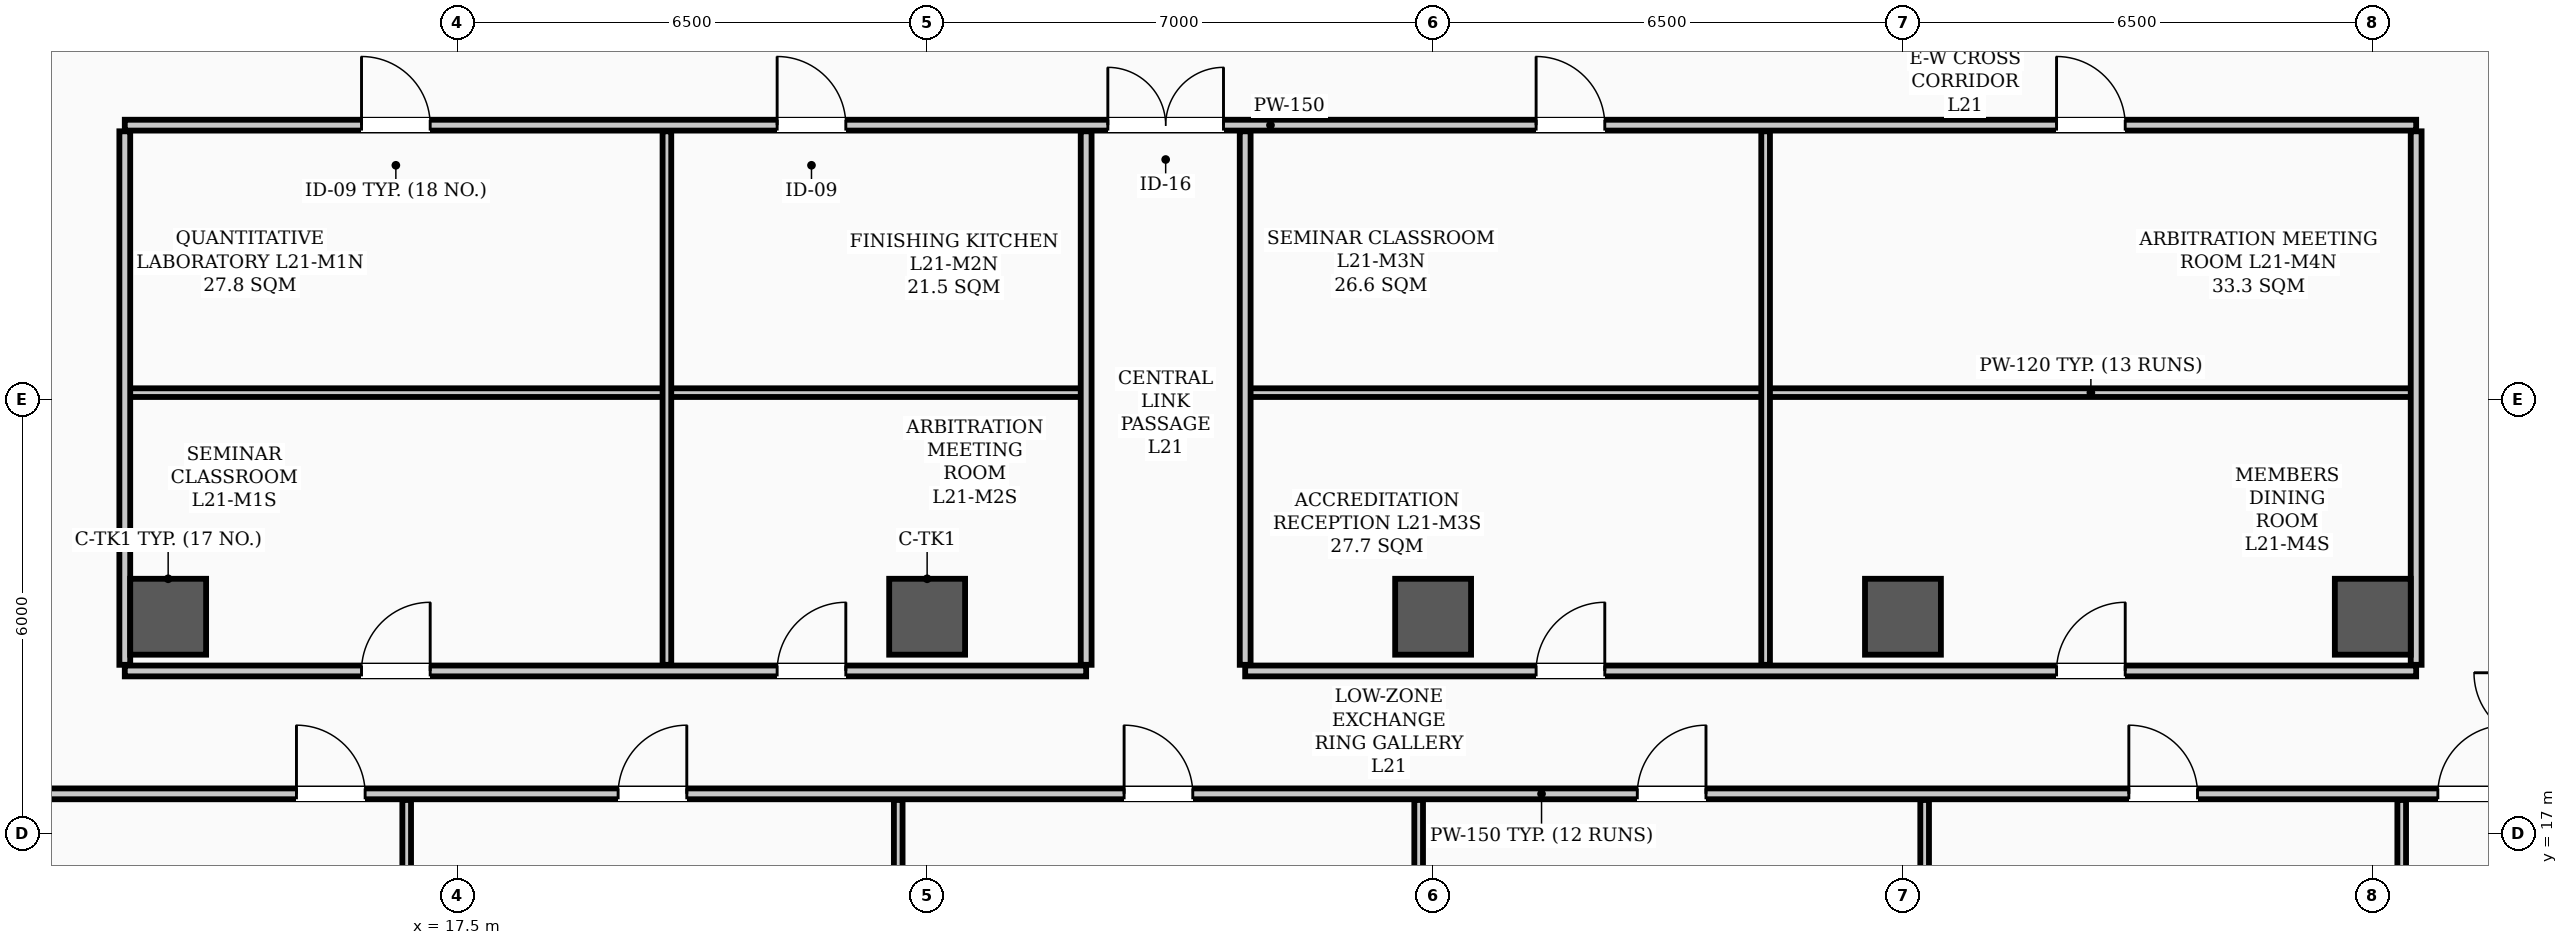
"""IFC4 building model, lengths in metres.
Left out: names, types, materials, properties, quantities, classifications, styles, units other than length and angle.
Written with IfcOpenShell. Run it as: python <this file> out.ifc"""

import sys

from ifc_helpers import new_model, si_unit, direction, frame, frame_2d, origin, origin_2d, place, context, subcontext, project, spatial, rectangle, hollow_rectangle, extrude, element, fill, save


model = new_model("IFC4")
c1 = context("Model", 3, precision=1e-05, world=origin(), true_north=direction((0.0, 1.0)))
c2 = subcontext(c1, "Body", "Model", "MODEL_VIEW")
j1 = project(units=[si_unit("LENGTHUNIT", "METRE"), si_unit("PLANEANGLEUNIT", "RADIAN")], contexts=[c1])
p1 = place(None, origin())
s1 = spatial("IfcSite", under=j1, at=p1, CompositionType="ELEMENT")
p2 = place(p1, origin())
s2 = spatial("IfcBuilding", under=s1, at=p2, CompositionType="ELEMENT")
p3 = place(p2, frame((0.0, 0.0, 85.0)))
s3 = spatial("IfcBuildingStorey", under=s2, at=p3, CompositionType="ELEMENT", Elevation=85.0)
for number, where, z_axis, x_axis in (
    (1, (13.5, 20.0, 0.0), (0.0, 0.0, 1.0), (1.0, 0.0, 0.0)),
    (2, (24.0, 20.0, 0.0), (0.0, 0.0, 1.0), (1.0, 0.0, 0.0)),
    (3, (31.0, 20.0, 0.0), (0.0, 0.0, 1.0), (1.0, 0.0, 0.0)),
    (4, (37.5, 20.0, 0.0), (0.0, 0.0, 1.0), (1.0, 0.0, 0.0)),
    (5, (44.0, 20.0, 0.0), (0.0, 0.0, 1.0), (1.0, 0.0, 0.0)),
):
    element("IfcColumn", number, at=place(p3, frame(where, z_axis=z_axis, x_axis=x_axis)), inside=s3, PredefinedType="COLUMN", context=c2, shape_type="SweptSolid", body=[
        extrude(hollow_rectangle(XDim=1.05, YDim=1.05, WallThickness=0.038, InnerFilletRadius=0.019, OuterFilletRadius=0.057, at=origin_2d()), origin(), (0.0, 0.0, 1.0), 3.9),
    ])
p4 = place(p3, frame((12.9, 26.8, 0.0), z_axis=(0.0, 0.0, 1.0), x_axis=(1.0, 0.0, 0.0)))
e6 = element("IfcWall", 6, at=p4, inside=s3, PredefinedType="PARTITIONING", context=c2, shape_type="SweptSolid", body=[
    extrude(rectangle(XDim=31.7, YDim=0.15, at=frame_2d((15.85, 0.0))), origin(), (0.0, 0.0, 1.0), 3.1),
])
p5 = place(p4, frame((13.6, 0.0, 0.0)))
e7 = element("IfcOpeningElement", 7, at=p5, cuts=e6, PredefinedType="OPENING", context=c2, shape_type="SweptSolid", body=[
    extrude(rectangle(XDim=1.6, YDim=2.08, at=frame_2d((0.8, 1.04))), frame((0.0, 0.085, 0.0), z_axis=(0.0, -1.0, 0.0), x_axis=(1.0, 0.0, 0.0)), (0.0, 0.0, 1.0), 0.17),
])
p6 = place(p4, frame((3.275, 0.0, 0.0)))
e8 = element("IfcOpeningElement", 8, at=p6, cuts=e6, PredefinedType="OPENING", context=c2, shape_type="SweptSolid", body=[
    extrude(rectangle(XDim=0.95, YDim=2.08, at=frame_2d((0.475, 1.04))), frame((0.0, 0.085, 0.0), z_axis=(0.0, -1.0, 0.0), x_axis=(1.0, 0.0, 0.0)), (0.0, 0.0, 1.0), 0.17),
])
p7 = place(p4, frame((9.025, 0.0, 0.0)))
e9 = element("IfcOpeningElement", 9, at=p7, cuts=e6, PredefinedType="OPENING", context=c2, shape_type="SweptSolid", body=[
    extrude(rectangle(XDim=0.95, YDim=2.08, at=frame_2d((0.475, 1.04))), frame((0.0, 0.085, 0.0), z_axis=(0.0, -1.0, 0.0), x_axis=(1.0, 0.0, 0.0)), (0.0, 0.0, 1.0), 0.17),
])
p8 = place(p4, frame((19.525, 0.0, 0.0)))
e10 = element("IfcOpeningElement", 10, at=p8, cuts=e6, PredefinedType="OPENING", context=c2, shape_type="SweptSolid", body=[
    extrude(rectangle(XDim=0.95, YDim=2.08, at=frame_2d((0.475, 1.04))), frame((0.0, 0.085, 0.0), z_axis=(0.0, -1.0, 0.0), x_axis=(1.0, 0.0, 0.0)), (0.0, 0.0, 1.0), 0.17),
])
p9 = place(p4, frame((26.725, 0.0, 0.0)))
e11 = element("IfcOpeningElement", 11, at=p9, cuts=e6, PredefinedType="OPENING", context=c2, shape_type="SweptSolid", body=[
    extrude(rectangle(XDim=0.95, YDim=2.08, at=frame_2d((0.475, 1.04))), frame((0.0, 0.085, 0.0), z_axis=(0.0, -1.0, 0.0), x_axis=(1.0, 0.0, 0.0)), (0.0, 0.0, 1.0), 0.17),
])
p10 = place(p3, frame((7.81, 17.55, 0.0), z_axis=(0.0, 0.0, 1.0), x_axis=(1.0, 0.0, 0.0)))
e12 = element("IfcWall", 12, at=p10, inside=s3, PredefinedType="PARTITIONING", context=c2, shape_type="SweptSolid", body=[
    extrude(rectangle(XDim=49.38, YDim=0.15, at=frame_2d((24.69, 0.0))), origin(), (0.0, 0.0, 1.0), 3.1),
])
p11 = place(p10, frame((7.465, 0.0, 0.0)))
e13 = element("IfcOpeningElement", 13, at=p11, cuts=e12, PredefinedType="OPENING", context=c2, shape_type="SweptSolid", body=[
    extrude(rectangle(XDim=0.95, YDim=2.08, at=frame_2d((0.475, 1.04))), frame((0.0, 0.085, 0.0), z_axis=(0.0, -1.0, 0.0), x_axis=(1.0, 0.0, 0.0)), (0.0, 0.0, 1.0), 0.17),
])
p12 = place(p10, frame((11.915, 0.0, 0.0)))
e14 = element("IfcOpeningElement", 14, at=p12, cuts=e12, PredefinedType="OPENING", context=c2, shape_type="SweptSolid", body=[
    extrude(rectangle(XDim=0.95, YDim=2.08, at=frame_2d((0.475, 1.04))), frame((0.0, 0.085, 0.0), z_axis=(0.0, -1.0, 0.0), x_axis=(1.0, 0.0, 0.0)), (0.0, 0.0, 1.0), 0.17),
])
p13 = place(p10, frame((18.915, 0.0, 0.0)))
e15 = element("IfcOpeningElement", 15, at=p13, cuts=e12, PredefinedType="OPENING", context=c2, shape_type="SweptSolid", body=[
    extrude(rectangle(XDim=0.95, YDim=2.08, at=frame_2d((0.475, 1.04))), frame((0.0, 0.085, 0.0), z_axis=(0.0, -1.0, 0.0), x_axis=(1.0, 0.0, 0.0)), (0.0, 0.0, 1.0), 0.17),
])
p14 = place(p10, frame((26.015, 0.0, 0.0)))
e16 = element("IfcOpeningElement", 16, at=p14, cuts=e12, PredefinedType="OPENING", context=c2, shape_type="SweptSolid", body=[
    extrude(rectangle(XDim=0.95, YDim=2.08, at=frame_2d((0.475, 1.04))), frame((0.0, 0.085, 0.0), z_axis=(0.0, -1.0, 0.0), x_axis=(1.0, 0.0, 0.0)), (0.0, 0.0, 1.0), 0.17),
])
p15 = place(p10, frame((32.815, 0.0, 0.0)))
e17 = element("IfcOpeningElement", 17, at=p15, cuts=e12, PredefinedType="OPENING", context=c2, shape_type="SweptSolid", body=[
    extrude(rectangle(XDim=0.95, YDim=2.08, at=frame_2d((0.475, 1.04))), frame((0.0, 0.085, 0.0), z_axis=(0.0, -1.0, 0.0), x_axis=(1.0, 0.0, 0.0)), (0.0, 0.0, 1.0), 0.17),
])
p16 = place(p10, frame((37.09, 0.0, 0.0)))
e18 = element("IfcOpeningElement", 18, at=p16, cuts=e12, PredefinedType="OPENING", context=c2, shape_type="SweptSolid", body=[
    extrude(rectangle(XDim=0.95, YDim=2.08, at=frame_2d((0.475, 1.04))), frame((0.0, 0.085, 0.0), z_axis=(0.0, -1.0, 0.0), x_axis=(1.0, 0.0, 0.0)), (0.0, 0.0, 1.0), 0.17),
])
p17 = place(p3, frame((12.9, 19.25, 0.0), z_axis=(0.0, 0.0, 1.0), x_axis=(1.0, 0.0, 0.0)))
e19 = element("IfcWall", 19, at=p17, inside=s3, PredefinedType="PARTITIONING", context=c2, shape_type="SweptSolid", body=[
    extrude(rectangle(XDim=13.3, YDim=0.15, at=frame_2d((6.65, 0.0))), origin(), (0.0, 0.0, 1.0), 3.1),
])
p18 = place(p17, frame((3.275, 0.0, 0.0)))
e20 = element("IfcOpeningElement", 20, at=p18, cuts=e19, PredefinedType="OPENING", context=c2, shape_type="SweptSolid", body=[
    extrude(rectangle(XDim=0.95, YDim=2.08, at=frame_2d((0.475, 1.04))), frame((0.0, 0.085, 0.0), z_axis=(0.0, -1.0, 0.0), x_axis=(1.0, 0.0, 0.0)), (0.0, 0.0, 1.0), 0.17),
])
p19 = place(p17, frame((9.025, 0.0, 0.0)))
e21 = element("IfcOpeningElement", 21, at=p19, cuts=e19, PredefinedType="OPENING", context=c2, shape_type="SweptSolid", body=[
    extrude(rectangle(XDim=0.95, YDim=2.08, at=frame_2d((0.475, 1.04))), frame((0.0, 0.085, 0.0), z_axis=(0.0, -1.0, 0.0), x_axis=(1.0, 0.0, 0.0)), (0.0, 0.0, 1.0), 0.17),
])
p20 = place(p3, frame((28.4, 19.25, 0.0), z_axis=(0.0, 0.0, 1.0), x_axis=(1.0, 0.0, 0.0)))
e22 = element("IfcWall", 22, at=p20, inside=s3, PredefinedType="PARTITIONING", context=c2, shape_type="SweptSolid", body=[
    extrude(rectangle(XDim=16.2, YDim=0.15, at=frame_2d((8.1, 0.0))), origin(), (0.0, 0.0, 1.0), 3.1),
])
p21 = place(p20, frame((4.025, 0.0, 0.0)))
e23 = element("IfcOpeningElement", 23, at=p21, cuts=e22, PredefinedType="OPENING", context=c2, shape_type="SweptSolid", body=[
    extrude(rectangle(XDim=0.95, YDim=2.08, at=frame_2d((0.475, 1.04))), frame((0.0, 0.085, 0.0), z_axis=(0.0, -1.0, 0.0), x_axis=(1.0, 0.0, 0.0)), (0.0, 0.0, 1.0), 0.17),
])
p22 = place(p20, frame((11.225, 0.0, 0.0)))
e24 = element("IfcOpeningElement", 24, at=p22, cuts=e22, PredefinedType="OPENING", context=c2, shape_type="SweptSolid", body=[
    extrude(rectangle(XDim=0.95, YDim=2.08, at=frame_2d((0.475, 1.04))), frame((0.0, 0.085, 0.0), z_axis=(0.0, -1.0, 0.0), x_axis=(1.0, 0.0, 0.0)), (0.0, 0.0, 1.0), 0.17),
])
p23 = place(p3, frame((12.9, 23.1, 0.0), z_axis=(0.0, 0.0, 1.0), x_axis=(1.0, 0.0, 0.0)))
e25 = element("IfcWall", 25, at=p23, inside=s3, PredefinedType="PARTITIONING", context=c2, shape_type="SweptSolid", body=[
    extrude(rectangle(XDim=7.5, YDim=0.12, at=frame_2d((3.75, 0.0))), origin(), (0.0, 0.0, 1.0), 3.1),
])
p24 = place(p3, frame((20.4, 23.1, 0.0), z_axis=(0.0, 0.0, 1.0), x_axis=(1.0, 0.0, 0.0)))
e26 = element("IfcWall", 26, at=p24, inside=s3, PredefinedType="PARTITIONING", context=c2, shape_type="SweptSolid", body=[
    extrude(rectangle(XDim=5.8, YDim=0.12, at=frame_2d((2.9, 0.0))), origin(), (0.0, 0.0, 1.0), 3.1),
])
p25 = place(p3, frame((28.4, 23.1, 0.0), z_axis=(0.0, 0.0, 1.0), x_axis=(1.0, 0.0, 0.0)))
e27 = element("IfcWall", 27, at=p25, inside=s3, PredefinedType="PARTITIONING", context=c2, shape_type="SweptSolid", body=[
    extrude(rectangle(XDim=7.2, YDim=0.12, at=frame_2d((3.6, 0.0))), origin(), (0.0, 0.0, 1.0), 3.1),
])
p26 = place(p3, frame((35.6, 23.1, 0.0), z_axis=(0.0, 0.0, 1.0), x_axis=(1.0, 0.0, 0.0)))
e28 = element("IfcWall", 28, at=p26, inside=s3, PredefinedType="PARTITIONING", context=c2, shape_type="SweptSolid", body=[
    extrude(rectangle(XDim=9.0, YDim=0.12, at=frame_2d((4.5, 0.0))), origin(), (0.0, 0.0, 1.0), 3.1),
])
for number, where, z_axis, x_axis in (
    (29, (26.2, 19.335, 0.0), (0.0, 0.0, 1.0), (0.0, 1.0, 0.0)),
    (30, (28.4, 19.335, 0.0), (0.0, 0.0, 1.0), (0.0, 1.0, 0.0)),
    (31, (12.9, 19.335, 0.0), (0.0, 0.0, 1.0), (0.0, 1.0, 0.0)),
    (32, (44.6, 19.335, 0.0), (0.0, 0.0, 1.0), (0.0, 1.0, 0.0)),
):
    element("IfcWall", number, at=place(p3, frame(where, z_axis=z_axis, x_axis=x_axis)), inside=s3, PredefinedType="PARTITIONING", context=c2, shape_type="SweptSolid", body=[
        extrude(rectangle(XDim=7.38, YDim=0.15, at=frame_2d((3.69, 0.0))), origin(), (0.0, 0.0, 1.0), 3.0),
    ])
p27 = place(p3, frame((16.8, 9.81, 0.0), z_axis=(0.0, 0.0, 1.0), x_axis=(0.0, 1.0, 0.0)))
e33 = element("IfcWall", 33, at=p27, inside=s3, PredefinedType="PARTITIONING", context=c2, shape_type="SweptSolid", body=[
    extrude(rectangle(XDim=7.655, YDim=0.12, at=frame_2d((3.828, 0.0))), origin(), (0.0, 0.0, 1.0), 3.212),
])
p28 = place(p3, frame((23.6, 11.57, 0.0), z_axis=(0.0, 0.0, 1.0), x_axis=(0.0, 1.0, 0.0)))
e34 = element("IfcWall", 34, at=p28, inside=s3, PredefinedType="PARTITIONING", context=c2, shape_type="SweptSolid", body=[
    extrude(rectangle(XDim=5.895, YDim=0.12, at=frame_2d((2.948, 0.0))), origin(), (0.0, 0.0, 1.0), 3.1),
])
for number, where, z_axis, x_axis in (
    (35, (30.8, 9.81, 0.0), (0.0, 0.0, 1.0), (0.0, 1.0, 0.0)),
    (36, (37.8, 9.81, 0.0), (0.0, 0.0, 1.0), (0.0, 1.0, 0.0)),
    (37, (44.4, 9.81, 0.0), (0.0, 0.0, 1.0), (0.0, 1.0, 0.0)),
):
    element("IfcWall", number, at=place(p3, frame(where, z_axis=z_axis, x_axis=x_axis)), inside=s3, PredefinedType="PARTITIONING", context=c2, shape_type="SweptSolid", body=[
        extrude(rectangle(XDim=7.655, YDim=0.12, at=frame_2d((3.828, 0.0))), origin(), (0.0, 0.0, 1.0), 3.1),
    ])
for number, where, z_axis, x_axis in (
    (38, (20.4, 19.335, 0.0), (0.0, 0.0, 1.0), (0.0, 1.0, 0.0)),
    (39, (35.6, 19.335, 0.0), (0.0, 0.0, 1.0), (0.0, 1.0, 0.0)),
):
    element("IfcWall", number, at=place(p3, frame(where, z_axis=z_axis, x_axis=x_axis)), inside=s3, PredefinedType="PARTITIONING", context=c2, shape_type="SweptSolid", body=[
        extrude(rectangle(XDim=7.38, YDim=0.12, at=frame_2d((3.69, 0.0))), origin(), (0.0, 0.0, 1.0), 3.0),
    ])
p29 = place(p5, origin())
e40 = element("IfcDoor", 40, at=p29, inside=s3, OperationType="DOUBLE_DOOR_SINGLE_SWING", PredefinedType="DOOR", context=c2, shape_type="SweptSolid", body=[
    extrude(rectangle(XDim=1.6, YDim=2.08, at=frame_2d((0.8, 1.04))), frame((0.0, 0.025, 0.0), z_axis=(0.0, -1.0, 0.0), x_axis=(1.0, 0.0, 0.0)), (0.0, 0.0, 1.0), 0.05),
])
fill(e7, e40)
p30 = place(p11, origin())
e41 = element("IfcDoor", 41, at=p30, inside=s3, OperationType="SINGLE_SWING_LEFT", PredefinedType="DOOR", context=c2, shape_type="SweptSolid", body=[
    extrude(rectangle(XDim=0.95, YDim=2.08, at=frame_2d((0.475, 1.04))), frame((0.0, 0.025, 0.0), z_axis=(0.0, -1.0, 0.0), x_axis=(1.0, 0.0, 0.0)), (0.0, 0.0, 1.0), 0.05),
])
fill(e13, e41)
p31 = place(p12, origin())
e42 = element("IfcDoor", 42, at=p31, inside=s3, OperationType="SINGLE_SWING_RIGHT", PredefinedType="DOOR", context=c2, shape_type="SweptSolid", body=[
    extrude(rectangle(XDim=0.95, YDim=2.08, at=frame_2d((0.475, 1.04))), frame((0.0, 0.025, 0.0), z_axis=(0.0, -1.0, 0.0), x_axis=(1.0, 0.0, 0.0)), (0.0, 0.0, 1.0), 0.05),
])
fill(e14, e42)
p32 = place(p13, origin())
e43 = element("IfcDoor", 43, at=p32, inside=s3, OperationType="SINGLE_SWING_LEFT", PredefinedType="DOOR", context=c2, shape_type="SweptSolid", body=[
    extrude(rectangle(XDim=0.95, YDim=2.08, at=frame_2d((0.475, 1.04))), frame((0.0, 0.025, 0.0), z_axis=(0.0, -1.0, 0.0), x_axis=(1.0, 0.0, 0.0)), (0.0, 0.0, 1.0), 0.05),
])
fill(e15, e43)
p33 = place(p14, origin())
e44 = element("IfcDoor", 44, at=p33, inside=s3, OperationType="SINGLE_SWING_RIGHT", PredefinedType="DOOR", context=c2, shape_type="SweptSolid", body=[
    extrude(rectangle(XDim=0.95, YDim=2.08, at=frame_2d((0.475, 1.04))), frame((0.0, 0.025, 0.0), z_axis=(0.0, -1.0, 0.0), x_axis=(1.0, 0.0, 0.0)), (0.0, 0.0, 1.0), 0.05),
])
fill(e16, e44)
p34 = place(p15, origin())
e45 = element("IfcDoor", 45, at=p34, inside=s3, OperationType="SINGLE_SWING_LEFT", PredefinedType="DOOR", context=c2, shape_type="SweptSolid", body=[
    extrude(rectangle(XDim=0.95, YDim=2.08, at=frame_2d((0.475, 1.04))), frame((0.0, 0.025, 0.0), z_axis=(0.0, -1.0, 0.0), x_axis=(1.0, 0.0, 0.0)), (0.0, 0.0, 1.0), 0.05),
])
fill(e17, e45)
p35 = place(p16, origin())
e46 = element("IfcDoor", 46, at=p35, inside=s3, OperationType="SINGLE_SWING_RIGHT", PredefinedType="DOOR", context=c2, shape_type="SweptSolid", body=[
    extrude(rectangle(XDim=0.95, YDim=2.08, at=frame_2d((0.475, 1.04))), frame((0.0, 0.025, 0.0), z_axis=(0.0, -1.0, 0.0), x_axis=(1.0, 0.0, 0.0)), (0.0, 0.0, 1.0), 0.05),
])
fill(e18, e46)
p36 = place(p6, origin())
e47 = element("IfcDoor", 47, at=p36, inside=s3, OperationType="SINGLE_SWING_LEFT", PredefinedType="DOOR", context=c2, shape_type="SweptSolid", body=[
    extrude(rectangle(XDim=0.95, YDim=2.08, at=frame_2d((0.475, 1.04))), frame((0.0, 0.025, 0.0), z_axis=(0.0, -1.0, 0.0), x_axis=(1.0, 0.0, 0.0)), (0.0, 0.0, 1.0), 0.05),
])
fill(e8, e47)
p37 = place(p18, origin())
e48 = element("IfcDoor", 48, at=p37, inside=s3, OperationType="SINGLE_SWING_RIGHT", PredefinedType="DOOR", context=c2, shape_type="SweptSolid", body=[
    extrude(rectangle(XDim=0.95, YDim=2.08, at=frame_2d((0.475, 1.04))), frame((0.0, 0.025, 0.0), z_axis=(0.0, -1.0, 0.0), x_axis=(1.0, 0.0, 0.0)), (0.0, 0.0, 1.0), 0.05),
])
fill(e20, e48)
p38 = place(p7, origin())
e49 = element("IfcDoor", 49, at=p38, inside=s3, OperationType="SINGLE_SWING_LEFT", PredefinedType="DOOR", context=c2, shape_type="SweptSolid", body=[
    extrude(rectangle(XDim=0.95, YDim=2.08, at=frame_2d((0.475, 1.04))), frame((0.0, 0.025, 0.0), z_axis=(0.0, -1.0, 0.0), x_axis=(1.0, 0.0, 0.0)), (0.0, 0.0, 1.0), 0.05),
])
fill(e9, e49)
p39 = place(p19, origin())
e50 = element("IfcDoor", 50, at=p39, inside=s3, OperationType="SINGLE_SWING_RIGHT", PredefinedType="DOOR", context=c2, shape_type="SweptSolid", body=[
    extrude(rectangle(XDim=0.95, YDim=2.08, at=frame_2d((0.475, 1.04))), frame((0.0, 0.025, 0.0), z_axis=(0.0, -1.0, 0.0), x_axis=(1.0, 0.0, 0.0)), (0.0, 0.0, 1.0), 0.05),
])
fill(e21, e50)
p40 = place(p8, origin())
e51 = element("IfcDoor", 51, at=p40, inside=s3, OperationType="SINGLE_SWING_LEFT", PredefinedType="DOOR", context=c2, shape_type="SweptSolid", body=[
    extrude(rectangle(XDim=0.95, YDim=2.08, at=frame_2d((0.475, 1.04))), frame((0.0, 0.025, 0.0), z_axis=(0.0, -1.0, 0.0), x_axis=(1.0, 0.0, 0.0)), (0.0, 0.0, 1.0), 0.05),
])
fill(e10, e51)
p41 = place(p21, origin())
e52 = element("IfcDoor", 52, at=p41, inside=s3, OperationType="SINGLE_SWING_RIGHT", PredefinedType="DOOR", context=c2, shape_type="SweptSolid", body=[
    extrude(rectangle(XDim=0.95, YDim=2.08, at=frame_2d((0.475, 1.04))), frame((0.0, 0.025, 0.0), z_axis=(0.0, -1.0, 0.0), x_axis=(1.0, 0.0, 0.0)), (0.0, 0.0, 1.0), 0.05),
])
fill(e23, e52)
p42 = place(p9, origin())
e53 = element("IfcDoor", 53, at=p42, inside=s3, OperationType="SINGLE_SWING_LEFT", PredefinedType="DOOR", context=c2, shape_type="SweptSolid", body=[
    extrude(rectangle(XDim=0.95, YDim=2.08, at=frame_2d((0.475, 1.04))), frame((0.0, 0.025, 0.0), z_axis=(0.0, -1.0, 0.0), x_axis=(1.0, 0.0, 0.0)), (0.0, 0.0, 1.0), 0.05),
])
fill(e11, e53)
p43 = place(p22, origin())
e54 = element("IfcDoor", 54, at=p43, inside=s3, OperationType="SINGLE_SWING_RIGHT", PredefinedType="DOOR", context=c2, shape_type="SweptSolid", body=[
    extrude(rectangle(XDim=0.95, YDim=2.08, at=frame_2d((0.475, 1.04))), frame((0.0, 0.025, 0.0), z_axis=(0.0, -1.0, 0.0), x_axis=(1.0, 0.0, 0.0)), (0.0, 0.0, 1.0), 0.05),
])
fill(e24, e54)
save(model, sys.argv[1])
